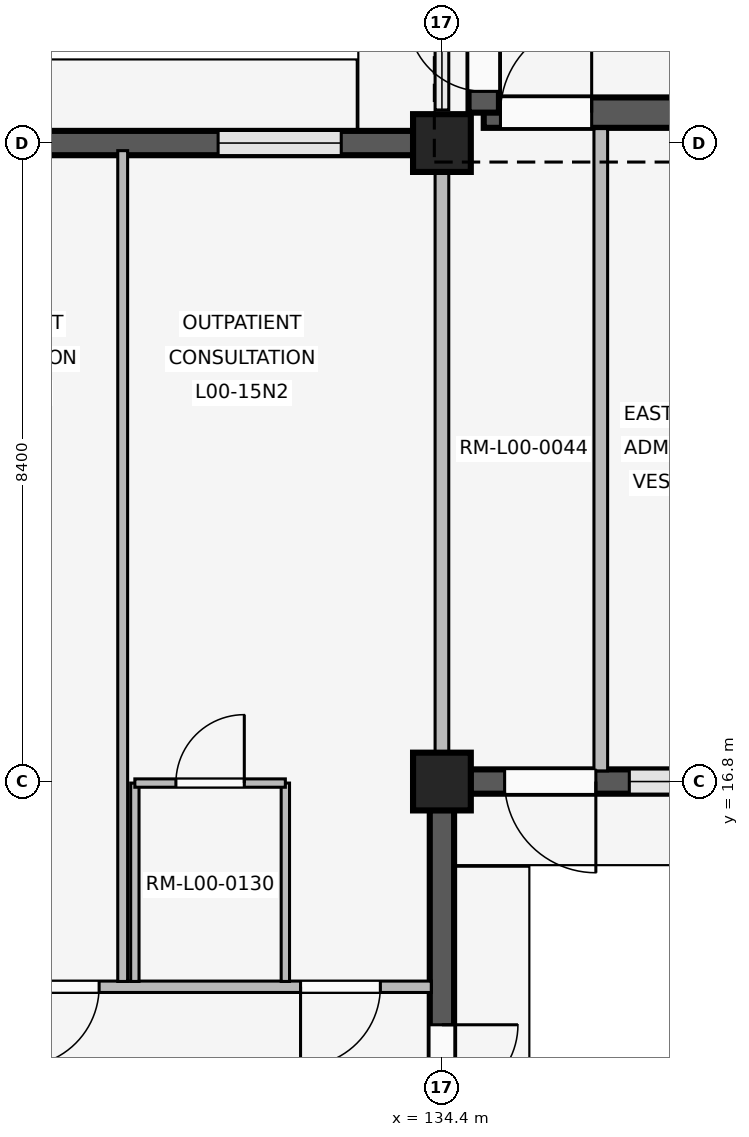
"""IFC4 building model, lengths in metres.
Left out: names, types, materials, properties, quantities, classifications, styles, units other than length and angle.
Written with IfcOpenShell. Run it as: python <this file> out.ifc"""

import sys

from ifc_helpers import new_model, si_unit, direction, frame, frame_2d, origin, origin_2d, place, context, subcontext, project, spatial, rectangle, extrude, element, fill, save


model = new_model("IFC4")
c1 = context("Model", 3, precision=1e-05, world=origin(), true_north=direction((0.0, 1.0)))
c2 = subcontext(c1, "Body", "Model", "MODEL_VIEW")
j1 = project(units=[si_unit("LENGTHUNIT", "METRE"), si_unit("PLANEANGLEUNIT", "RADIAN")], contexts=[c1])
p1 = place(None, origin())
s1 = spatial("IfcSite", under=j1, at=p1, CompositionType="ELEMENT")
p2 = place(p1, origin())
s2 = spatial("IfcBuilding", under=s1, at=p2, CompositionType="ELEMENT")
p3 = place(p2, origin())
s3 = spatial("IfcBuildingStorey", under=s2, at=p3, CompositionType="ELEMENT", Elevation=0.0)
for number, where, z_axis, x_axis in (
    (1, (134.4, 16.8, 0.0), (0.0, 0.0, 1.0), (1.0, 0.0, 0.0)),
    (2, (134.4, 25.2, 0.0), (0.0, 0.0, 1.0), (1.0, 0.0, 0.0)),
):
    element("IfcColumn", number, at=place(p3, frame(where, z_axis=z_axis, x_axis=x_axis)), inside=s3, PredefinedType="COLUMN", context=c2, shape_type="SweptSolid", body=[
        extrude(rectangle(XDim=0.76, YDim=0.76, at=origin_2d()), origin(), (0.0, 0.0, 1.0), 4.8),
    ])
p4 = place(p3, frame((134.4, 16.425, 0.0), z_axis=(0.0, 0.0, 1.0), x_axis=(0.0, -1.0, 0.0)))
e3 = element("IfcWall", 3, at=p4, inside=s3, PredefinedType="SOLIDWALL", context=c2, shape_type="SweptSolid", body=[
    extrude(rectangle(XDim=7.65, YDim=0.32, at=frame_2d((3.825, 0.0))), origin(), (0.0, 0.0, 1.0), 3.82),
])
p5 = place(p4, frame((2.825, 0.0, 0.0)))
e4 = element("IfcOpeningElement", 4, at=p5, cuts=e3, PredefinedType="OPENING", context=c2, shape_type="SweptSolid", body=[
    extrude(rectangle(XDim=2.0, YDim=2.4, at=frame_2d((1.0, 1.2))), frame((0.0, 0.17, 0.0), z_axis=(0.0, -1.0, 0.0), x_axis=(1.0, 0.0, 0.0)), (0.0, 0.0, 1.0), 0.34),
])
p6 = place(p3, frame((126.375, 25.2, 0.0), z_axis=(0.0, 0.0, 1.0), x_axis=(1.0, 0.0, 0.0)))
e5 = element("IfcWall", 5, at=p6, inside=s3, PredefinedType="SOLIDWALL", context=c2, shape_type="SweptSolid", body=[
    extrude(rectangle(XDim=7.65, YDim=0.32, at=frame_2d((3.825, 0.0))), origin(), (0.0, 0.0, 1.0), 3.82),
])
p7 = place(p6, frame((0.949, 0.0, 0.85)))
e6 = element("IfcOpeningElement", 6, at=p7, cuts=e5, PredefinedType="OPENING", context=c2, shape_type="SweptSolid", body=[
    extrude(rectangle(XDim=1.62, YDim=1.8, at=frame_2d((0.81, 0.9))), frame((0.0, 0.17, 0.0), z_axis=(0.0, -1.0, 0.0), x_axis=(1.0, 0.0, 0.0)), (0.0, 0.0, 1.0), 0.34),
])
p8 = place(p6, frame((5.081, 0.0, 0.85)))
e7 = element("IfcOpeningElement", 7, at=p8, cuts=e5, PredefinedType="OPENING", context=c2, shape_type="SweptSolid", body=[
    extrude(rectangle(XDim=1.62, YDim=1.8, at=frame_2d((0.81, 0.9))), frame((0.0, 0.17, 0.0), z_axis=(0.0, -1.0, 0.0), x_axis=(1.0, 0.0, 0.0)), (0.0, 0.0, 1.0), 0.34),
])
p9 = place(p3, frame((142.425, 16.8, 0.0), z_axis=(0.0, 0.0, 1.0), x_axis=(-1.0, 0.0, 0.0)))
e8 = element("IfcWall", 8, at=p9, inside=s3, PredefinedType="SOLIDWALL", context=c2, shape_type="SweptSolid", body=[
    extrude(rectangle(XDim=7.65, YDim=0.32, at=frame_2d((3.825, 0.0))), origin(), (0.0, 0.0, 1.0), 3.82),
])
p10 = place(p9, frame((6.0, 0.0, 0.0)))
e9 = element("IfcOpeningElement", 9, at=p10, cuts=e8, PredefinedType="OPENING", context=c2, shape_type="SweptSolid", body=[
    extrude(rectangle(XDim=1.2, YDim=2.25, at=frame_2d((0.6, 1.125))), frame((0.0, 0.17, 0.0), z_axis=(0.0, -1.0, 0.0), x_axis=(1.0, 0.0, 0.0)), (0.0, 0.0, 1.0), 0.34),
])
p11 = place(p9, frame((1.129, 0.0, 0.85)))
e10 = element("IfcOpeningElement", 10, at=p11, cuts=e8, PredefinedType="OPENING", context=c2, shape_type="SweptSolid", body=[
    extrude(rectangle(XDim=1.26, YDim=1.52, at=frame_2d((0.63, 0.76))), frame((0.0, 0.17, 0.0), z_axis=(0.0, -1.0, 0.0), x_axis=(1.0, 0.0, 0.0)), (0.0, 0.0, 1.0), 0.34),
])
p12 = place(p9, frame((4.3, 0.0, 0.85)))
e11 = element("IfcOpeningElement", 11, at=p12, cuts=e8, PredefinedType="OPENING", context=c2, shape_type="SweptSolid", body=[
    extrude(rectangle(XDim=1.26, YDim=1.52, at=frame_2d((0.63, 0.76))), frame((0.0, 0.17, 0.0), z_axis=(0.0, -1.0, 0.0), x_axis=(1.0, 0.0, 0.0)), (0.0, 0.0, 1.0), 0.34),
])
p13 = place(p3, frame((134.95, 25.6, 0.0), z_axis=(0.0, 0.0, 1.0), x_axis=(1.0, 0.0, 0.0)))
e12 = element("IfcWall", 12, at=p13, inside=s3, PredefinedType="SHEAR", context=c2, shape_type="SweptSolid", body=[
    extrude(rectangle(XDim=7.5, YDim=0.4, at=frame_2d((3.75, 0.0))), origin(), (0.0, 0.0, 1.0), 4.52),
])
p14 = place(p13, frame((4.85, 0.0, 0.0)))
e13 = element("IfcOpeningElement", 13, at=p14, cuts=e12, PredefinedType="OPENING", context=c2, shape_type="SweptSolid", body=[
    extrude(rectangle(XDim=1.2, YDim=2.2, at=frame_2d((0.6, 1.1))), frame((0.0, 0.21, 0.0), z_axis=(0.0, -1.0, 0.0), x_axis=(1.0, 0.0, 0.0)), (0.0, 0.0, 1.0), 0.42),
])
p15 = place(p13, frame((0.22, 0.0, 0.0)))
e14 = element("IfcOpeningElement", 14, at=p15, cuts=e12, PredefinedType="OPENING", context=c2, shape_type="SweptSolid", body=[
    extrude(rectangle(XDim=1.2, YDim=2.2, at=frame_2d((0.6, 1.1))), frame((0.0, 0.21, 0.0), z_axis=(0.0, -1.0, 0.0), x_axis=(1.0, 0.0, 0.0)), (0.0, 0.0, 1.0), 0.42),
])
p16 = place(p3, frame((134.95, 25.6, 0.0), z_axis=(0.0, 0.0, 1.0), x_axis=(0.0, 1.0, 0.0)))
e15 = element("IfcWall", 15, at=p16, inside=s3, PredefinedType="SHEAR", context=c2, shape_type="SweptSolid", body=[
    extrude(rectangle(XDim=7.55, YDim=0.4, at=frame_2d((3.775, 0.0))), origin(), (0.0, 0.0, 1.0), 4.52),
])
p17 = place(p16, frame((0.28, 0.0, 0.0)))
e16 = element("IfcOpeningElement", 16, at=p17, cuts=e15, PredefinedType="OPENING", context=c2, shape_type="SweptSolid", body=[
    extrude(rectangle(XDim=1.0, YDim=2.15, at=frame_2d((0.5, 1.075))), frame((0.0, 0.21, 0.0), z_axis=(0.0, -1.0, 0.0), x_axis=(1.0, 0.0, 0.0)), (0.0, 0.0, 1.0), 0.42),
])
p18 = place(p3, frame((134.4, 17.18, 0.0), z_axis=(0.0, 0.0, 1.0), x_axis=(0.0, 1.0, 0.0)))
e17 = element("IfcWall", 17, at=p18, inside=s3, PredefinedType="PARTITIONING", context=c2, shape_type="SweptSolid", body=[
    extrude(rectangle(XDim=7.88, YDim=0.18, at=frame_2d((3.94, 0.0))), origin(), (0.0, 0.0, 1.0), 3.8),
])
p19 = place(p3, frame((134.26, 14.1, 0.0), z_axis=(0.0, 0.0, 1.0), x_axis=(-1.0, 0.0, 0.0)))
e18 = element("IfcWall", 18, at=p19, inside=s3, PredefinedType="PARTITIONING", context=c2, shape_type="SweptSolid", body=[
    extrude(rectangle(XDim=8.18, YDim=0.15, at=frame_2d((4.09, 0.0))), origin(), (0.0, 0.0, 1.0), 3.8),
])
p20 = place(p19, frame((0.67, 0.0, 0.0)))
e19 = element("IfcOpeningElement", 19, at=p20, cuts=e18, PredefinedType="OPENING", context=c2, shape_type="SweptSolid", body=[
    extrude(rectangle(XDim=1.05, YDim=2.2, at=frame_2d((0.525, 1.1))), frame((0.0, 0.085, 0.0), z_axis=(0.0, -1.0, 0.0), x_axis=(1.0, 0.0, 0.0)), (0.0, 0.0, 1.0), 0.17),
])
p21 = place(p19, frame((4.37, 0.0, 0.0)))
e20 = element("IfcOpeningElement", 20, at=p21, cuts=e18, PredefinedType="OPENING", context=c2, shape_type="SweptSolid", body=[
    extrude(rectangle(XDim=1.05, YDim=2.2, at=frame_2d((0.525, 1.1))), frame((0.0, 0.085, 0.0), z_axis=(0.0, -1.0, 0.0), x_axis=(1.0, 0.0, 0.0)), (0.0, 0.0, 1.0), 0.17),
])
p22 = place(p3, frame((130.2, 14.17, 0.0), z_axis=(0.0, 0.0, 1.0), x_axis=(0.0, 1.0, 0.0)))
e21 = element("IfcWall", 21, at=p22, inside=s3, PredefinedType="PARTITIONING", context=c2, shape_type="SweptSolid", body=[
    extrude(rectangle(XDim=10.93, YDim=0.13, at=frame_2d((5.465, 0.0))), origin(), (0.0, 0.0, 1.0), 3.8),
])
for number, where, z_axis, x_axis in (
    (22, (130.36, 14.17, 0.0), (0.0, 0.0, 1.0), (0.0, 1.0, 0.0)),
    (23, (132.34, 14.17, 0.0), (0.0, 0.0, 1.0), (0.0, 1.0, 0.0)),
):
    element("IfcWall", number, at=place(p3, frame(where, z_axis=z_axis, x_axis=x_axis)), inside=s3, PredefinedType="PARTITIONING", context=c2, shape_type="SweptSolid", body=[
        extrude(rectangle(XDim=2.61, YDim=0.11, at=frame_2d((1.305, 0.0))), origin(), (0.0, 0.0, 1.0), 3.8),
    ])
p23 = place(p3, frame((130.36, 16.78, 0.0), z_axis=(0.0, 0.0, 1.0), x_axis=(1.0, 0.0, 0.0)))
e24 = element("IfcWall", 24, at=p23, inside=s3, PredefinedType="PARTITIONING", context=c2, shape_type="SweptSolid", body=[
    extrude(rectangle(XDim=1.98, YDim=0.11, at=frame_2d((0.99, 0.0))), origin(), (0.0, 0.0, 1.0), 3.8),
])
p24 = place(p23, frame((0.54, 0.0, 0.0)))
e25 = element("IfcOpeningElement", 25, at=p24, cuts=e24, PredefinedType="OPENING", context=c2, shape_type="SweptSolid", body=[
    extrude(rectangle(XDim=0.9, YDim=2.1, at=frame_2d((0.45, 1.05))), frame((0.0, 0.065, 0.0), z_axis=(0.0, -1.0, 0.0), x_axis=(1.0, 0.0, 0.0)), (0.0, 0.0, 1.0), 0.13),
])
p25 = place(p3, frame((136.49, 16.94, 0.0), z_axis=(0.0, 0.0, 1.0), x_axis=(0.0, 1.0, 0.0)))
e26 = element("IfcWall", 26, at=p25, inside=s3, PredefinedType="PARTITIONING", context=c2, shape_type="SweptSolid", body=[
    extrude(rectangle(XDim=8.45, YDim=0.18, at=frame_2d((4.225, 0.0))), origin(), (0.0, 0.0, 1.0), 3.8),
])
p26 = place(p5, origin())
e27 = element("IfcDoor", 27, at=p26, inside=s3, OperationType="DOUBLE_SWING_LEFT", PredefinedType="DOOR", context=c2, shape_type="SweptSolid", body=[
    extrude(rectangle(XDim=2.0, YDim=2.4, at=frame_2d((1.0, 1.2))), frame((0.0, 0.025, 0.0), z_axis=(0.0, -1.0, 0.0), x_axis=(1.0, 0.0, 0.0)), (0.0, 0.0, 1.0), 0.05),
])
fill(e4, e27)
p27 = place(p8, origin())
e28 = element("IfcWindow", 28, at=p27, inside=s3, PartitioningType="SINGLE_PANEL", PredefinedType="WINDOW", context=c2, shape_type="SweptSolid", body=[
    extrude(rectangle(XDim=1.62, YDim=1.8, at=frame_2d((0.81, 0.9))), frame((0.0, 0.03, 0.0), z_axis=(0.0, -1.0, 0.0), x_axis=(1.0, 0.0, 0.0)), (0.0, 0.0, 1.0), 0.06),
])
fill(e7, e28)
p28 = place(p10, origin())
e29 = element("IfcDoor", 29, at=p28, inside=s3, OperationType="SINGLE_SWING_LEFT", PredefinedType="DOOR", context=c2, shape_type="SweptSolid", body=[
    extrude(rectangle(XDim=1.2, YDim=2.25, at=frame_2d((0.6, 1.125))), frame((0.0, 0.025, 0.0), z_axis=(0.0, -1.0, 0.0), x_axis=(1.0, 0.0, 0.0)), (0.0, 0.0, 1.0), 0.05),
])
fill(e9, e29)
p29 = place(p12, origin())
e30 = element("IfcWindow", 30, at=p29, inside=s3, PartitioningType="SINGLE_PANEL", PredefinedType="WINDOW", context=c2, shape_type="SweptSolid", body=[
    extrude(rectangle(XDim=1.26, YDim=1.52, at=frame_2d((0.63, 0.76))), frame((0.0, 0.03, 0.0), z_axis=(0.0, -1.0, 0.0), x_axis=(1.0, 0.0, 0.0)), (0.0, 0.0, 1.0), 0.06),
])
fill(e11, e30)
p30 = place(p17, origin())
e31 = element("IfcDoor", 31, at=p30, inside=s3, OperationType="SINGLE_SWING_RIGHT", PredefinedType="DOOR", context=c2, shape_type="SweptSolid", body=[
    extrude(rectangle(XDim=1.0, YDim=2.15, at=frame_2d((0.5, 1.075))), frame((0.0, 0.025, 0.0), z_axis=(0.0, -1.0, 0.0), x_axis=(1.0, 0.0, 0.0)), (0.0, 0.0, 1.0), 0.05),
])
fill(e16, e31)
p31 = place(p15, origin())
e32 = element("IfcDoor", 32, at=p31, inside=s3, OperationType="SINGLE_SWING_RIGHT", PredefinedType="DOOR", context=c2, shape_type="SweptSolid", body=[
    extrude(rectangle(XDim=1.2, YDim=2.2, at=frame_2d((0.6, 1.1))), frame((0.0, 0.025, 0.0), z_axis=(0.0, -1.0, 0.0), x_axis=(1.0, 0.0, 0.0)), (0.0, 0.0, 1.0), 0.05),
])
fill(e14, e32)
p32 = place(p20, origin())
e33 = element("IfcDoor", 33, at=p32, inside=s3, OperationType="SINGLE_SWING_RIGHT", PredefinedType="DOOR", context=c2, shape_type="SweptSolid", body=[
    extrude(rectangle(XDim=1.05, YDim=2.2, at=frame_2d((0.525, 1.1))), frame((0.0, 0.025, 0.0), z_axis=(0.0, -1.0, 0.0), x_axis=(1.0, 0.0, 0.0)), (0.0, 0.0, 1.0), 0.05),
])
fill(e19, e33)
p33 = place(p21, origin())
e34 = element("IfcDoor", 34, at=p33, inside=s3, OperationType="SINGLE_SWING_RIGHT", PredefinedType="DOOR", context=c2, shape_type="SweptSolid", body=[
    extrude(rectangle(XDim=1.05, YDim=2.2, at=frame_2d((0.525, 1.1))), frame((0.0, 0.025, 0.0), z_axis=(0.0, -1.0, 0.0), x_axis=(1.0, 0.0, 0.0)), (0.0, 0.0, 1.0), 0.05),
])
fill(e20, e34)
p34 = place(p24, origin())
e35 = element("IfcDoor", 35, at=p34, inside=s3, OperationType="SINGLE_SWING_RIGHT", PredefinedType="DOOR", context=c2, shape_type="SweptSolid", body=[
    extrude(rectangle(XDim=0.9, YDim=2.1, at=frame_2d((0.45, 1.05))), frame((0.0, 0.025, 0.0), z_axis=(0.0, -1.0, 0.0), x_axis=(1.0, 0.0, 0.0)), (0.0, 0.0, 1.0), 0.05),
])
fill(e25, e35)
save(model, sys.argv[1])
